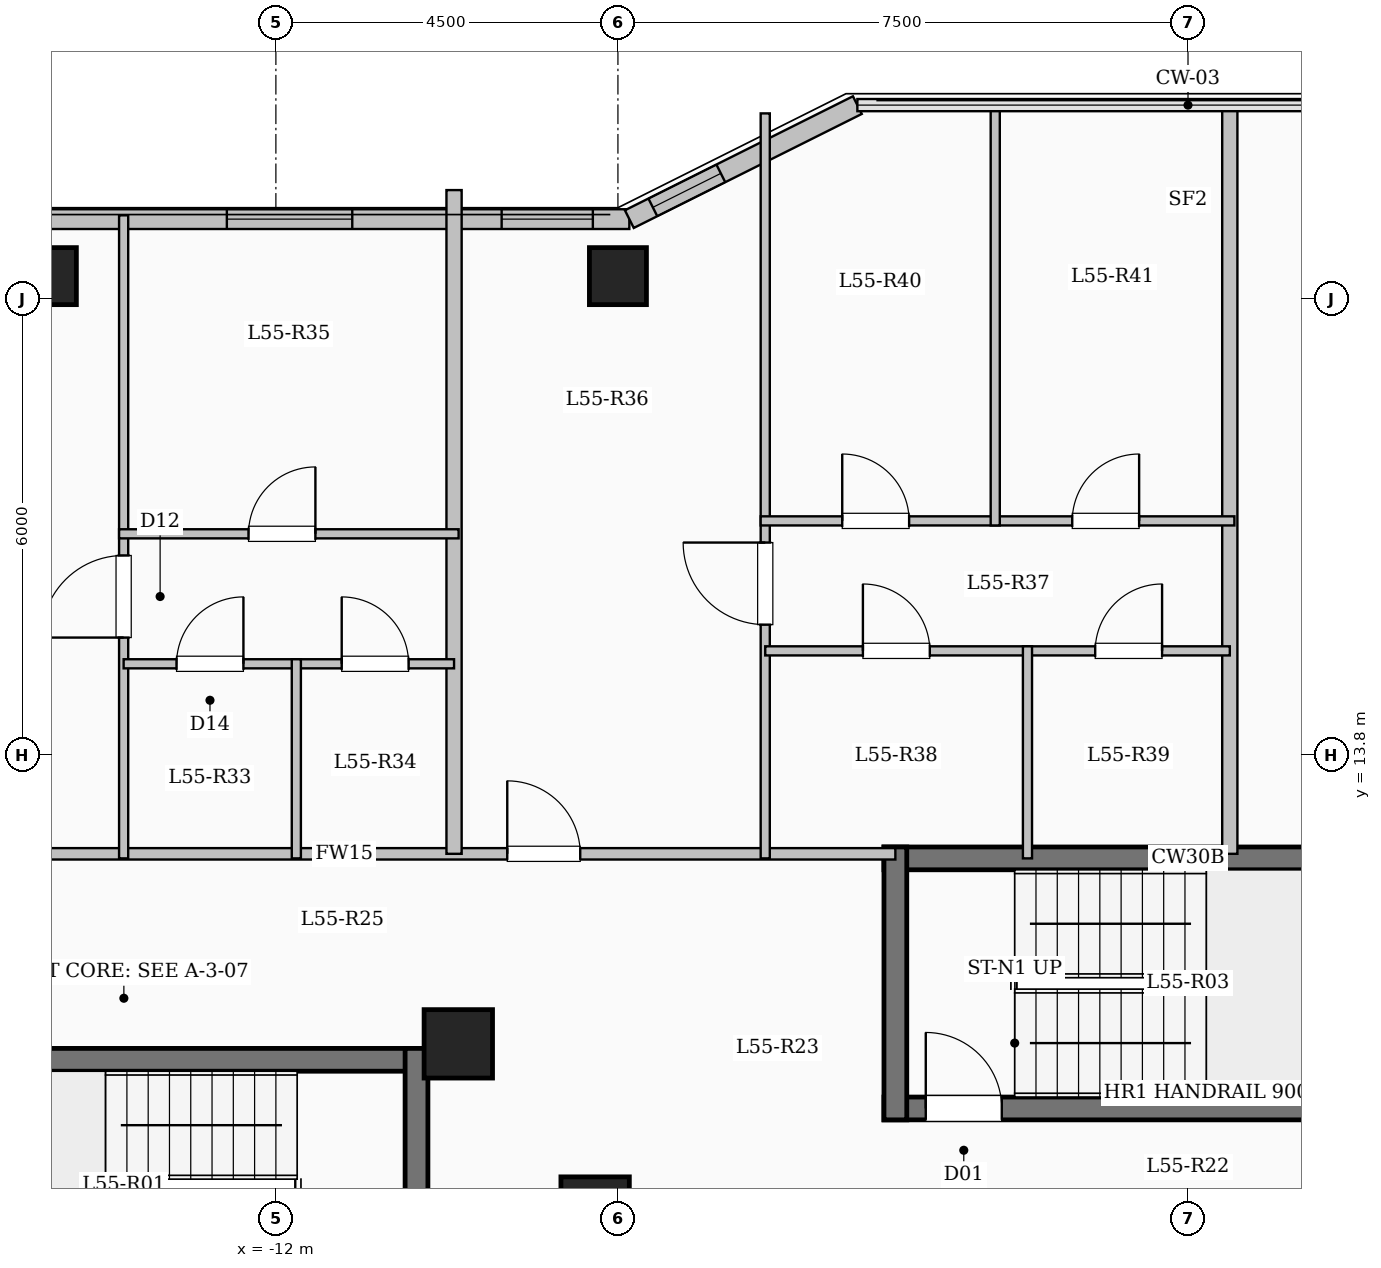
"""IFC4 building model, lengths in metres.
Left out: names, types, materials, properties, quantities, classifications, styles, units other than length and angle.
Written with IfcOpenShell. Run it as: python <this file> out.ifc"""

import sys

from ifc_helpers import new_model, si_unit, direction, frame, frame_2d, origin, origin_2d, place, context, subcontext, project, spatial, rectangle, extrude, element, fill, save


model = new_model("IFC4")
c1 = context("Model", 3, precision=1e-05, world=origin(), true_north=direction((0.0, 1.0)))
c2 = subcontext(c1, "Body", "Model", "MODEL_VIEW")
j1 = project(units=[si_unit("LENGTHUNIT", "METRE"), si_unit("PLANEANGLEUNIT", "RADIAN")], contexts=[c1])
p1 = place(None, origin())
s1 = spatial("IfcSite", under=j1, at=p1, CompositionType="ELEMENT")
p2 = place(p1, origin())
s2 = spatial("IfcBuilding", under=s1, at=p2, CompositionType="ELEMENT")
p3 = place(p2, frame((0.0, 0.0, 203.65)))
s3 = spatial("IfcBuildingStorey", under=s2, at=p3, CompositionType="ELEMENT", Elevation=203.65)
for number, where, z_axis, x_axis in (
    (1, (-7.8, 7.8, 0.0), (0.0, 0.0, 1.0), (1.0, 0.0, 0.0)),
    (2, (-9.6, 10.0, 0.0), (0.0, 0.0, 1.0), (1.0, 0.0, 0.0)),
):
    element("IfcColumn", number, at=place(p3, frame(where, z_axis=z_axis, x_axis=x_axis)), inside=s3, PredefinedType="COLUMN", context=c2, shape_type="SweptSolid", body=[
        extrude(rectangle(XDim=0.9, YDim=0.9, at=origin_2d()), origin(), (0.0, 0.0, 1.0), 3.35),
    ])
for number, where, z_axis, x_axis in (
    (3, (-15.0, 20.1, 0.0), (0.0, 0.0, 1.0), (1.0, 0.0, 0.0)),
    (4, (-7.5, 20.1, 0.0), (0.0, 0.0, 1.0), (1.0, 0.0, 0.0)),
):
    element("IfcColumn", number, at=place(p3, frame(where, z_axis=z_axis, x_axis=x_axis)), inside=s3, PredefinedType="COLUMN", context=c2, shape_type="SweptSolid", body=[
        extrude(rectangle(XDim=0.75, YDim=0.75, at=origin_2d()), origin(), (0.0, 0.0, 1.0), 3.35),
    ])
p4 = place(p3, frame((-18.45, 20.85, 0.0), z_axis=(0.0, 0.0, 1.0), x_axis=(1.0, 0.0, 0.0)))
e5 = element("IfcWall", 5, at=p4, inside=s3, PredefinedType="SOLIDWALL", context=c2, shape_type="SweptSolid", body=[
    extrude(rectangle(XDim=11.1, YDim=0.26, at=frame_2d((5.55, 0.0))), origin(), (0.0, 0.0, 1.0), 3.1),
])
p5 = place(p4, frame((1.16, 0.0, 0.9)))
e6 = element("IfcOpeningElement", 6, at=p5, cuts=e5, PredefinedType="OPENING", context=c2, shape_type="SweptSolid", body=[
    extrude(rectangle(XDim=2.2, YDim=1.75, at=frame_2d((1.1, 0.875))), frame((0.0, 0.14, 0.0), z_axis=(0.0, -1.0, 0.0), x_axis=(1.0, 0.0, 0.0)), (0.0, 0.0, 1.0), 0.28),
])
p6 = place(p4, frame((5.805, 0.0, 0.9)))
e7 = element("IfcOpeningElement", 7, at=p6, cuts=e5, PredefinedType="OPENING", context=c2, shape_type="SweptSolid", body=[
    extrude(rectangle(XDim=1.65, YDim=1.6, at=frame_2d((0.825, 0.8))), frame((0.0, 0.14, 0.0), z_axis=(0.0, -1.0, 0.0), x_axis=(1.0, 0.0, 0.0)), (0.0, 0.0, 1.0), 0.28),
])
p7 = place(p4, frame((9.42, 0.0, 0.95)))
e8 = element("IfcOpeningElement", 8, at=p7, cuts=e5, PredefinedType="OPENING", context=c2, shape_type="SweptSolid", body=[
    extrude(rectangle(XDim=1.2, YDim=1.5, at=frame_2d((0.6, 0.75))), frame((0.0, 0.14, 0.0), z_axis=(0.0, -1.0, 0.0), x_axis=(1.0, 0.0, 0.0)), (0.0, 0.0, 1.0), 0.28),
])
p8 = place(p3, frame((-7.35, 20.85, 0.0), z_axis=(0.0, 0.0, 1.0), x_axis=(0.894427191, 0.4472135955, 0.0)))
e9 = element("IfcWall", 9, at=p8, inside=s3, PredefinedType="SOLIDWALL", context=c2, shape_type="SweptSolid", body=[
    extrude(rectangle(XDim=3.354, YDim=0.26, at=frame_2d((1.677, 0.0))), origin(), (0.0, 0.0, 1.0), 3.1),
])
p9 = place(p8, frame((0.346, 0.0, 0.95)))
e10 = element("IfcOpeningElement", 10, at=p9, cuts=e9, PredefinedType="OPENING", context=c2, shape_type="SweptSolid", body=[
    extrude(rectangle(XDim=1.0, YDim=1.5, at=frame_2d((0.5, 0.75))), frame((0.0, 0.14, 0.0), z_axis=(0.0, -1.0, 0.0), x_axis=(1.0, 0.0, 0.0)), (0.0, 0.0, 1.0), 0.28),
])
p10 = place(p3, frame((-18.0, 9.79, 0.0), z_axis=(0.0, 0.0, 1.0), x_axis=(1.0, 0.0, 0.0)))
e11 = element("IfcWall", 11, at=p10, inside=s3, PredefinedType="SHEAR", context=c2, shape_type="SweptSolid", body=[
    extrude(rectangle(XDim=8.0, YDim=0.3, at=frame_2d((4.0, 0.0))), origin(), (0.0, 0.0, 1.0), 3.35),
])
p11 = place(p3, frame((-10.15, 6.35, 0.0), z_axis=(0.0, 0.0, 1.0), x_axis=(0.0, 1.0, 0.0)))
e12 = element("IfcWall", 12, at=p11, inside=s3, PredefinedType="SHEAR", context=c2, shape_type="SweptSolid", body=[
    extrude(rectangle(XDim=3.59, YDim=0.3, at=frame_2d((1.795, 0.0))), origin(), (0.0, 0.0, 1.0), 3.35),
])
p12 = place(p3, frame((-4.0, 12.44, 0.0), z_axis=(0.0, 0.0, 1.0), x_axis=(1.0, 0.0, 0.0)))
e13 = element("IfcWall", 13, at=p12, inside=s3, PredefinedType="SHEAR", context=c2, shape_type="SweptSolid", body=[
    extrude(rectangle(XDim=8.0, YDim=0.3, at=frame_2d((4.0, 0.0))), origin(), (0.0, 0.0, 1.0), 3.35),
])
p13 = place(p3, frame((-4.0, 9.15, 0.0), z_axis=(0.0, 0.0, 1.0), x_axis=(1.0, 0.0, 0.0)))
e14 = element("IfcWall", 14, at=p13, inside=s3, PredefinedType="SHEAR", context=c2, shape_type="SweptSolid", body=[
    extrude(rectangle(XDim=8.0, YDim=0.3, at=frame_2d((4.0, 0.0))), origin(), (0.0, 0.0, 1.0), 3.35),
])
p14 = place(p13, frame((0.55, 0.0, 0.0)))
e15 = element("IfcOpeningElement", 15, at=p14, cuts=e14, PredefinedType="OPENING", context=c2, shape_type="SweptSolid", body=[
    extrude(rectangle(XDim=1.0, YDim=2.15, at=frame_2d((0.5, 1.075))), frame((0.0, 0.16, 0.0), z_axis=(0.0, -1.0, 0.0), x_axis=(1.0, 0.0, 0.0)), (0.0, 0.0, 1.0), 0.32),
])
p15 = place(p3, frame((-3.85, 9.0, 0.0), z_axis=(0.0, 0.0, 1.0), x_axis=(0.0, 1.0, 0.0)))
e16 = element("IfcWall", 16, at=p15, inside=s3, PredefinedType="SHEAR", context=c2, shape_type="SweptSolid", body=[
    extrude(rectangle(XDim=3.59, YDim=0.3, at=frame_2d((1.795, 0.0))), origin(), (0.0, 0.0, 1.0), 3.35),
])
p16 = place(p3, frame((-18.35, 12.5, 0.0), z_axis=(0.0, 0.0, 1.0), x_axis=(1.0, 0.0, 0.0)))
e17 = element("IfcWall", 17, at=p16, inside=s3, PredefinedType="PARTITIONING", context=c2, shape_type="SweptSolid", body=[
    extrude(rectangle(XDim=14.5, YDim=0.15, at=frame_2d((7.25, 0.0))), origin(), (0.0, 0.0, 1.0), 3.1),
])
p17 = place(p16, frame((0.7, 0.0, 0.0)))
e18 = element("IfcOpeningElement", 18, at=p17, cuts=e17, PredefinedType="OPENING", context=c2, shape_type="SweptSolid", body=[
    extrude(rectangle(XDim=0.96, YDim=2.15, at=frame_2d((0.48, 1.075))), frame((0.0, 0.085, 0.0), z_axis=(0.0, -1.0, 0.0), x_axis=(1.0, 0.0, 0.0)), (0.0, 0.0, 1.0), 0.17),
])
p18 = place(p16, frame((9.394, 0.0, 0.0)))
e19 = element("IfcOpeningElement", 19, at=p18, cuts=e17, PredefinedType="OPENING", context=c2, shape_type="SweptSolid", body=[
    extrude(rectangle(XDim=0.96, YDim=2.15, at=frame_2d((0.48, 1.075))), frame((0.0, 0.085, 0.0), z_axis=(0.0, -1.0, 0.0), x_axis=(1.0, 0.0, 0.0)), (0.0, 0.0, 1.0), 0.17),
])
p19 = place(p3, frame((0.55, 12.5, 0.0), z_axis=(0.0, 0.0, 1.0), x_axis=(0.0, 1.0, 0.0)))
e20 = element("IfcWall", 20, at=p19, inside=s3, PredefinedType="SOLIDWALL", context=c2, shape_type="SweptSolid", body=[
    extrude(rectangle(XDim=9.88, YDim=0.2, at=frame_2d((4.94, 0.0))), origin(), (0.0, 0.0, 1.0), 3.1),
])
p20 = place(p3, frame((-9.656, 12.5, 0.0), z_axis=(0.0, 0.0, 1.0), x_axis=(0.0, 1.0, 0.0)))
e21 = element("IfcWall", 21, at=p20, inside=s3, PredefinedType="SOLIDWALL", context=c2, shape_type="SweptSolid", body=[
    extrude(rectangle(XDim=8.732, YDim=0.2, at=frame_2d((4.366, 0.0))), origin(), (0.0, 0.0, 1.0), 3.1),
])
p21 = place(p3, frame((-14.003, 12.44, 0.0), z_axis=(0.0, 0.0, 1.0), x_axis=(0.0, 1.0, 0.0)))
e22 = element("IfcWall", 22, at=p21, inside=s3, PredefinedType="PARTITIONING", context=c2, shape_type="SweptSolid", body=[
    extrude(rectangle(XDim=8.46, YDim=0.12, at=frame_2d((4.23, 0.0))), origin(), (0.0, 0.0, 1.0), 3.1),
])
p22 = place(p21, frame((2.905, 0.0, 0.0)))
e23 = element("IfcOpeningElement", 23, at=p22, cuts=e22, PredefinedType="OPENING", context=c2, shape_type="SweptSolid", body=[
    extrude(rectangle(XDim=1.08, YDim=2.15, at=frame_2d((0.54, 1.075))), frame((0.0, 0.07, 0.0), z_axis=(0.0, -1.0, 0.0), x_axis=(1.0, 0.0, 0.0)), (0.0, 0.0, 1.0), 0.14),
])
p23 = place(p3, frame((-14.003, 15.0, 0.0), z_axis=(0.0, 0.0, 1.0), x_axis=(1.0, 0.0, 0.0)))
e24 = element("IfcWall", 24, at=p23, inside=s3, PredefinedType="PARTITIONING", context=c2, shape_type="SweptSolid", body=[
    extrude(rectangle(XDim=2.272, YDim=0.12, at=frame_2d((1.136, 0.0))), origin(), (0.0, 0.0, 1.0), 3.1),
])
p24 = place(p23, frame((0.696, 0.0, 0.0)))
e25 = element("IfcOpeningElement", 25, at=p24, cuts=e24, PredefinedType="OPENING", context=c2, shape_type="SweptSolid", body=[
    extrude(rectangle(XDim=0.88, YDim=2.1, at=frame_2d((0.44, 1.05))), frame((0.0, 0.07, 0.0), z_axis=(0.0, -1.0, 0.0), x_axis=(1.0, 0.0, 0.0)), (0.0, 0.0, 1.0), 0.14),
])
p25 = place(p3, frame((-11.731, 15.0, 0.0), z_axis=(0.0, 0.0, 1.0), x_axis=(1.0, 0.0, 0.0)))
e26 = element("IfcWall", 26, at=p25, inside=s3, PredefinedType="PARTITIONING", context=c2, shape_type="SweptSolid", body=[
    extrude(rectangle(XDim=2.075, YDim=0.12, at=frame_2d((1.038, 0.0))), origin(), (0.0, 0.0, 1.0), 3.1),
])
p26 = place(p25, frame((0.597, 0.0, 0.0)))
e27 = element("IfcOpeningElement", 27, at=p26, cuts=e26, PredefinedType="OPENING", context=c2, shape_type="SweptSolid", body=[
    extrude(rectangle(XDim=0.88, YDim=2.1, at=frame_2d((0.44, 1.05))), frame((0.0, 0.07, 0.0), z_axis=(0.0, -1.0, 0.0), x_axis=(1.0, 0.0, 0.0)), (0.0, 0.0, 1.0), 0.14),
])
p27 = place(p3, frame((-14.063, 16.71, 0.0), z_axis=(0.0, 0.0, 1.0), x_axis=(1.0, 0.0, 0.0)))
e28 = element("IfcWall", 28, at=p27, inside=s3, PredefinedType="PARTITIONING", context=c2, shape_type="SweptSolid", body=[
    extrude(rectangle(XDim=4.467, YDim=0.12, at=frame_2d((2.233, 0.0))), origin(), (0.0, 0.0, 1.0), 2.725),
])
p28 = place(p27, frame((1.703, 0.0, 0.0)))
e29 = element("IfcOpeningElement", 29, at=p28, cuts=e28, PredefinedType="OPENING", context=c2, shape_type="SweptSolid", body=[
    extrude(rectangle(XDim=0.88, YDim=2.1, at=frame_2d((0.44, 1.05))), frame((0.0, 0.07, 0.0), z_axis=(0.0, -1.0, 0.0), x_axis=(1.0, 0.0, 0.0)), (0.0, 0.0, 1.0), 0.14),
])
p29 = place(p3, frame((-11.731, 12.44, 0.0), z_axis=(0.0, 0.0, 1.0), x_axis=(0.0, 1.0, 0.0)))
e30 = element("IfcWall", 30, at=p29, inside=s3, PredefinedType="PARTITIONING", context=c2, shape_type="SweptSolid", body=[
    extrude(rectangle(XDim=2.62, YDim=0.12, at=frame_2d((1.31, 0.0))), origin(), (0.0, 0.0, 1.0), 3.1),
])
p30 = place(p3, frame((-5.562, 12.44, 0.0), z_axis=(0.0, 0.0, 1.0), x_axis=(0.0, 1.0, 0.0)))
e31 = element("IfcWall", 31, at=p30, inside=s3, PredefinedType="PARTITIONING", context=c2, shape_type="SweptSolid", body=[
    extrude(rectangle(XDim=9.801, YDim=0.12, at=frame_2d((4.9, 0.0))), origin(), (0.0, 0.0, 1.0), 3.1),
])
p31 = place(p30, frame((3.075, 0.0, 0.0)))
e32 = element("IfcOpeningElement", 32, at=p31, cuts=e31, PredefinedType="OPENING", context=c2, shape_type="SweptSolid", body=[
    extrude(rectangle(XDim=1.08, YDim=2.15, at=frame_2d((0.54, 1.075))), frame((0.0, 0.07, 0.0), z_axis=(0.0, -1.0, 0.0), x_axis=(1.0, 0.0, 0.0)), (0.0, 0.0, 1.0), 0.14),
])
p32 = place(p3, frame((-5.562, 15.17, 0.0), z_axis=(0.0, 0.0, 1.0), x_axis=(1.0, 0.0, 0.0)))
e33 = element("IfcWall", 33, at=p32, inside=s3, PredefinedType="PARTITIONING", context=c2, shape_type="SweptSolid", body=[
    extrude(rectangle(XDim=3.45, YDim=0.12, at=frame_2d((1.725, 0.0))), origin(), (0.0, 0.0, 1.0), 3.1),
])
p33 = place(p32, frame((1.285, 0.0, 0.0)))
e34 = element("IfcOpeningElement", 34, at=p33, cuts=e33, PredefinedType="OPENING", context=c2, shape_type="SweptSolid", body=[
    extrude(rectangle(XDim=0.88, YDim=2.1, at=frame_2d((0.44, 1.05))), frame((0.0, 0.07, 0.0), z_axis=(0.0, -1.0, 0.0), x_axis=(1.0, 0.0, 0.0)), (0.0, 0.0, 1.0), 0.14),
])
p34 = place(p3, frame((-2.112, 15.17, 0.0), z_axis=(0.0, 0.0, 1.0), x_axis=(1.0, 0.0, 0.0)))
e35 = element("IfcWall", 35, at=p34, inside=s3, PredefinedType="PARTITIONING", context=c2, shape_type="SweptSolid", body=[
    extrude(rectangle(XDim=2.662, YDim=0.12, at=frame_2d((1.331, 0.0))), origin(), (0.0, 0.0, 1.0), 3.1),
])
p35 = place(p34, frame((0.891, 0.0, 0.0)))
e36 = element("IfcOpeningElement", 36, at=p35, cuts=e35, PredefinedType="OPENING", context=c2, shape_type="SweptSolid", body=[
    extrude(rectangle(XDim=0.88, YDim=2.1, at=frame_2d((0.44, 1.05))), frame((0.0, 0.07, 0.0), z_axis=(0.0, -1.0, 0.0), x_axis=(1.0, 0.0, 0.0)), (0.0, 0.0, 1.0), 0.14),
])
p36 = place(p3, frame((-5.622, 16.88, 0.0), z_axis=(0.0, 0.0, 1.0), x_axis=(1.0, 0.0, 0.0)))
e37 = element("IfcWall", 37, at=p36, inside=s3, PredefinedType="PARTITIONING", context=c2, shape_type="SweptSolid", body=[
    extrude(rectangle(XDim=6.232, YDim=0.12, at=frame_2d((3.116, 0.0))), origin(), (0.0, 0.0, 1.0), 2.725),
])
p37 = place(p36, frame((1.073, 0.0, 0.0)))
e38 = element("IfcOpeningElement", 38, at=p37, cuts=e37, PredefinedType="OPENING", context=c2, shape_type="SweptSolid", body=[
    extrude(rectangle(XDim=0.88, YDim=2.1, at=frame_2d((0.44, 1.05))), frame((0.0, 0.07, 0.0), z_axis=(0.0, -1.0, 0.0), x_axis=(1.0, 0.0, 0.0)), (0.0, 0.0, 1.0), 0.14),
])
p38 = place(p36, frame((4.099, 0.0, 0.0)))
e39 = element("IfcOpeningElement", 39, at=p38, cuts=e37, PredefinedType="OPENING", context=c2, shape_type="SweptSolid", body=[
    extrude(rectangle(XDim=0.88, YDim=2.1, at=frame_2d((0.44, 1.05))), frame((0.0, 0.07, 0.0), z_axis=(0.0, -1.0, 0.0), x_axis=(1.0, 0.0, 0.0)), (0.0, 0.0, 1.0), 0.14),
])
p39 = place(p3, frame((-2.112, 12.44, 0.0), z_axis=(0.0, 0.0, 1.0), x_axis=(0.0, 1.0, 0.0)))
e40 = element("IfcWall", 40, at=p39, inside=s3, PredefinedType="PARTITIONING", context=c2, shape_type="SweptSolid", body=[
    extrude(rectangle(XDim=2.79, YDim=0.12, at=frame_2d((1.395, 0.0))), origin(), (0.0, 0.0, 1.0), 3.1),
])
p40 = place(p3, frame((-2.536, 16.82, 0.0), z_axis=(0.0, 0.0, 1.0), x_axis=(0.0, 1.0, 0.0)))
e41 = element("IfcWall", 41, at=p40, inside=s3, PredefinedType="PARTITIONING", context=c2, shape_type="SweptSolid", body=[
    extrude(rectangle(XDim=5.56, YDim=0.12, at=frame_2d((2.78, 0.0))), origin(), (0.0, 0.0, 1.0), 3.1),
])
p41 = place(p6, origin())
e42 = element("IfcWindow", 42, at=p41, inside=s3, PartitioningType="SINGLE_PANEL", PredefinedType="WINDOW", context=c2, shape_type="SweptSolid", body=[
    extrude(rectangle(XDim=1.65, YDim=1.6, at=frame_2d((0.825, 0.8))), frame((0.0, 0.03, 0.0), z_axis=(0.0, -1.0, 0.0), x_axis=(1.0, 0.0, 0.0)), (0.0, 0.0, 1.0), 0.06),
])
fill(e7, e42)
p42 = place(p7, origin())
e43 = element("IfcWindow", 43, at=p42, inside=s3, PartitioningType="SINGLE_PANEL", PredefinedType="WINDOW", context=c2, shape_type="SweptSolid", body=[
    extrude(rectangle(XDim=1.2, YDim=1.5, at=frame_2d((0.6, 0.75))), frame((0.0, 0.03, 0.0), z_axis=(0.0, -1.0, 0.0), x_axis=(1.0, 0.0, 0.0)), (0.0, 0.0, 1.0), 0.06),
])
fill(e8, e43)
p43 = place(p9, origin())
e44 = element("IfcWindow", 44, at=p43, inside=s3, PartitioningType="SINGLE_PANEL", PredefinedType="WINDOW", context=c2, shape_type="SweptSolid", body=[
    extrude(rectangle(XDim=1.0, YDim=1.5, at=frame_2d((0.5, 0.75))), frame((0.0, 0.03, 0.0), z_axis=(0.0, -1.0, 0.0), x_axis=(1.0, 0.0, 0.0)), (0.0, 0.0, 1.0), 0.06),
])
fill(e10, e44)
p44 = place(p14, origin())
e45 = element("IfcDoor", 45, at=p44, inside=s3, OperationType="SINGLE_SWING_LEFT", PredefinedType="DOOR", context=c2, shape_type="SweptSolid", body=[
    extrude(rectangle(XDim=1.0, YDim=2.15, at=frame_2d((0.5, 1.075))), frame((0.0, 0.025, 0.0), z_axis=(0.0, -1.0, 0.0), x_axis=(1.0, 0.0, 0.0)), (0.0, 0.0, 1.0), 0.05),
])
fill(e15, e45)
p45 = place(p22, origin())
e46 = element("IfcDoor", 46, at=p45, inside=s3, OperationType="SINGLE_SWING_LEFT", PredefinedType="DOOR", context=c2, shape_type="SweptSolid", body=[
    extrude(rectangle(XDim=1.08, YDim=2.15, at=frame_2d((0.54, 1.075))), frame((0.0, 0.025, 0.0), z_axis=(0.0, -1.0, 0.0), x_axis=(1.0, 0.0, 0.0)), (0.0, 0.0, 1.0), 0.05),
])
fill(e23, e46)
p46 = place(p24, origin())
e47 = element("IfcDoor", 47, at=p46, inside=s3, OperationType="SINGLE_SWING_RIGHT", PredefinedType="DOOR", context=c2, shape_type="SweptSolid", body=[
    extrude(rectangle(XDim=0.88, YDim=2.1, at=frame_2d((0.44, 1.05))), frame((0.0, 0.025, 0.0), z_axis=(0.0, -1.0, 0.0), x_axis=(1.0, 0.0, 0.0)), (0.0, 0.0, 1.0), 0.05),
])
fill(e25, e47)
p47 = place(p26, origin())
e48 = element("IfcDoor", 48, at=p47, inside=s3, OperationType="SINGLE_SWING_LEFT", PredefinedType="DOOR", context=c2, shape_type="SweptSolid", body=[
    extrude(rectangle(XDim=0.88, YDim=2.1, at=frame_2d((0.44, 1.05))), frame((0.0, 0.025, 0.0), z_axis=(0.0, -1.0, 0.0), x_axis=(1.0, 0.0, 0.0)), (0.0, 0.0, 1.0), 0.05),
])
fill(e27, e48)
p48 = place(p28, origin())
e49 = element("IfcDoor", 49, at=p48, inside=s3, OperationType="SINGLE_SWING_RIGHT", PredefinedType="DOOR", context=c2, shape_type="SweptSolid", body=[
    extrude(rectangle(XDim=0.88, YDim=2.1, at=frame_2d((0.44, 1.05))), frame((0.0, 0.025, 0.0), z_axis=(0.0, -1.0, 0.0), x_axis=(1.0, 0.0, 0.0)), (0.0, 0.0, 1.0), 0.05),
])
fill(e29, e49)
p49 = place(p18, origin())
e50 = element("IfcDoor", 50, at=p49, inside=s3, OperationType="SINGLE_SWING_LEFT", PredefinedType="DOOR", context=c2, shape_type="SweptSolid", body=[
    extrude(rectangle(XDim=0.96, YDim=2.15, at=frame_2d((0.48, 1.075))), frame((0.0, 0.025, 0.0), z_axis=(0.0, -1.0, 0.0), x_axis=(1.0, 0.0, 0.0)), (0.0, 0.0, 1.0), 0.05),
])
fill(e19, e50)
p50 = place(p31, origin())
e51 = element("IfcDoor", 51, at=p50, inside=s3, OperationType="SINGLE_SWING_RIGHT", PredefinedType="DOOR", context=c2, shape_type="SweptSolid", body=[
    extrude(rectangle(XDim=1.08, YDim=2.15, at=frame_2d((0.54, 1.075))), frame((0.0, 0.025, 0.0), z_axis=(0.0, -1.0, 0.0), x_axis=(1.0, 0.0, 0.0)), (0.0, 0.0, 1.0), 0.05),
])
fill(e32, e51)
p51 = place(p33, origin())
e52 = element("IfcDoor", 52, at=p51, inside=s3, OperationType="SINGLE_SWING_LEFT", PredefinedType="DOOR", context=c2, shape_type="SweptSolid", body=[
    extrude(rectangle(XDim=0.88, YDim=2.1, at=frame_2d((0.44, 1.05))), frame((0.0, 0.025, 0.0), z_axis=(0.0, -1.0, 0.0), x_axis=(1.0, 0.0, 0.0)), (0.0, 0.0, 1.0), 0.05),
])
fill(e34, e52)
p52 = place(p35, origin())
e53 = element("IfcDoor", 53, at=p52, inside=s3, OperationType="SINGLE_SWING_RIGHT", PredefinedType="DOOR", context=c2, shape_type="SweptSolid", body=[
    extrude(rectangle(XDim=0.88, YDim=2.1, at=frame_2d((0.44, 1.05))), frame((0.0, 0.025, 0.0), z_axis=(0.0, -1.0, 0.0), x_axis=(1.0, 0.0, 0.0)), (0.0, 0.0, 1.0), 0.05),
])
fill(e36, e53)
p53 = place(p37, origin())
e54 = element("IfcDoor", 54, at=p53, inside=s3, OperationType="SINGLE_SWING_LEFT", PredefinedType="DOOR", context=c2, shape_type="SweptSolid", body=[
    extrude(rectangle(XDim=0.88, YDim=2.1, at=frame_2d((0.44, 1.05))), frame((0.0, 0.025, 0.0), z_axis=(0.0, -1.0, 0.0), x_axis=(1.0, 0.0, 0.0)), (0.0, 0.0, 1.0), 0.05),
])
fill(e38, e54)
p54 = place(p38, origin())
e55 = element("IfcDoor", 55, at=p54, inside=s3, OperationType="SINGLE_SWING_RIGHT", PredefinedType="DOOR", context=c2, shape_type="SweptSolid", body=[
    extrude(rectangle(XDim=0.88, YDim=2.1, at=frame_2d((0.44, 1.05))), frame((0.0, 0.025, 0.0), z_axis=(0.0, -1.0, 0.0), x_axis=(1.0, 0.0, 0.0)), (0.0, 0.0, 1.0), 0.05),
])
fill(e39, e55)
save(model, sys.argv[1])
